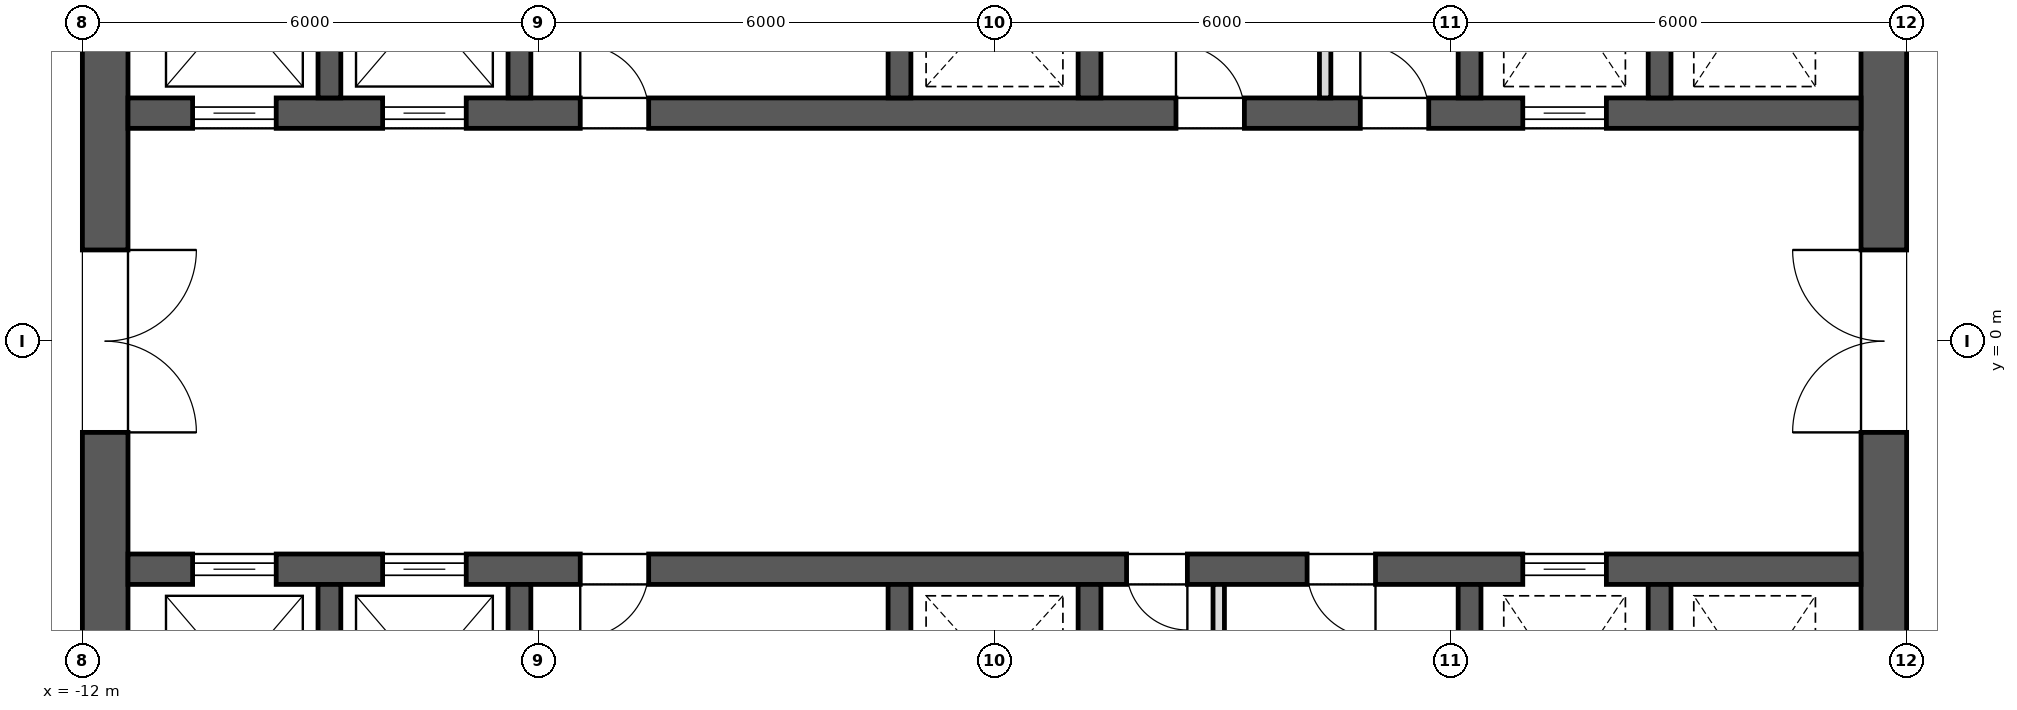
"""IFC4 building model, lengths in metres.
Left out: names, types, materials, properties, quantities, classifications, styles, units other than length and angle.
Written with IfcOpenShell. Run it as: python <this file> out.ifc"""

import sys

from ifc_helpers import new_model, si_unit, direction, frame, frame_2d, origin, place, context, subcontext, project, spatial, rectangle, extrude, element, fill, save


model = new_model("IFC4")
c1 = context("Model", 3, precision=1e-05, world=origin(), true_north=direction((0.0, 1.0)))
c2 = subcontext(c1, "Body", "Model", "MODEL_VIEW")
j1 = project(units=[si_unit("LENGTHUNIT", "METRE"), si_unit("PLANEANGLEUNIT", "RADIAN")], contexts=[c1])
p1 = place(None, origin())
s1 = spatial("IfcSite", under=j1, at=p1, CompositionType="ELEMENT")
p2 = place(p1, origin())
s2 = spatial("IfcBuilding", under=s1, at=p2, CompositionType="ELEMENT")
p3 = place(p2, frame((0.0, 0.0, 316.3)))
s3 = spatial("IfcBuildingStorey", under=s2, at=p3, CompositionType="ELEMENT", Elevation=316.3)
p4 = place(p3, frame((11.7, -11.4, 0.0), z_axis=(0.0, 0.0, 1.0), x_axis=(0.0, 1.0, 0.0)))
e1 = element("IfcWall", 1, at=p4, inside=s3, PredefinedType="SHEAR", context=c2, shape_type="SweptSolid", body=[
    extrude(rectangle(XDim=22.8, YDim=0.6, at=frame_2d((11.4, 0.0))), origin(), (0.0, 0.0, 1.0), 4.0),
])
p5 = place(p4, frame((10.2, 0.0, 0.0)))
e2 = element("IfcOpeningElement", 2, at=p5, cuts=e1, PredefinedType="OPENING", context=c2, shape_type="SweptSolid", body=[
    extrude(rectangle(XDim=2.4, YDim=2.1, at=frame_2d((1.2, 1.05))), frame((0.0, 0.312, 0.0), z_axis=(0.0, -1.0, 0.0), x_axis=(1.0, 0.0, 0.0)), (0.0, 0.0, 1.0), 0.624),
])
p6 = place(p4, frame((19.5, 0.0, 0.0)))
e3 = element("IfcOpeningElement", 3, at=p6, cuts=e1, PredefinedType="OPENING", context=c2, shape_type="SweptSolid", body=[
    extrude(rectangle(XDim=1.2, YDim=2.1, at=frame_2d((0.6, 1.05))), frame((0.0, 0.312, 0.0), z_axis=(0.0, -1.0, 0.0), x_axis=(1.0, 0.0, 0.0)), (0.0, 0.0, 1.0), 0.624),
])
p7 = place(p4, frame((2.1, 0.0, 0.0)))
e4 = element("IfcOpeningElement", 4, at=p7, cuts=e1, PredefinedType="OPENING", context=c2, shape_type="SweptSolid", body=[
    extrude(rectangle(XDim=1.2, YDim=2.1, at=frame_2d((0.6, 1.05))), frame((0.0, 0.312, 0.0), z_axis=(0.0, -1.0, 0.0), x_axis=(1.0, 0.0, 0.0)), (0.0, 0.0, 1.0), 0.624),
])
p8 = place(p3, frame((-11.7, -11.4, 0.0), z_axis=(0.0, 0.0, 1.0), x_axis=(0.0, 1.0, 0.0)))
e5 = element("IfcWall", 5, at=p8, inside=s3, PredefinedType="SHEAR", context=c2, shape_type="SweptSolid", body=[
    extrude(rectangle(XDim=22.8, YDim=0.6, at=frame_2d((11.4, 0.0))), origin(), (0.0, 0.0, 1.0), 4.0),
])
p9 = place(p8, frame((10.2, 0.0, 0.0)))
e6 = element("IfcOpeningElement", 6, at=p9, cuts=e5, PredefinedType="OPENING", context=c2, shape_type="SweptSolid", body=[
    extrude(rectangle(XDim=2.4, YDim=2.1, at=frame_2d((1.2, 1.05))), frame((0.0, 0.312, 0.0), z_axis=(0.0, -1.0, 0.0), x_axis=(1.0, 0.0, 0.0)), (0.0, 0.0, 1.0), 0.624),
])
p10 = place(p8, frame((18.925, 0.0, 0.0)))
e7 = element("IfcOpeningElement", 7, at=p10, cuts=e5, PredefinedType="OPENING", context=c2, shape_type="SweptSolid", body=[
    extrude(rectangle(XDim=1.2, YDim=2.1, at=frame_2d((0.6, 1.05))), frame((0.0, 0.312, 0.0), z_axis=(0.0, -1.0, 0.0), x_axis=(1.0, 0.0, 0.0)), (0.0, 0.0, 1.0), 0.624),
])
p11 = place(p8, frame((2.675, 0.0, 0.0)))
e8 = element("IfcOpeningElement", 8, at=p11, cuts=e5, PredefinedType="OPENING", context=c2, shape_type="SweptSolid", body=[
    extrude(rectangle(XDim=1.2, YDim=2.1, at=frame_2d((0.6, 1.05))), frame((0.0, 0.312, 0.0), z_axis=(0.0, -1.0, 0.0), x_axis=(1.0, 0.0, 0.0)), (0.0, 0.0, 1.0), 0.624),
])
p12 = place(p3, frame((-11.4, 3.0, 0.0), z_axis=(0.0, 0.0, 1.0), x_axis=(1.0, 0.0, 0.0)))
e9 = element("IfcWall", 9, at=p12, inside=s3, PredefinedType="SHEAR", context=c2, shape_type="SweptSolid", body=[
    extrude(rectangle(XDim=22.8, YDim=0.4, at=frame_2d((11.4, 0.0))), origin(), (0.0, 0.0, 1.0), 4.0),
])
p13 = place(p12, frame((0.85, 0.0, 0.0)))
e10 = element("IfcOpeningElement", 10, at=p13, cuts=e9, PredefinedType="OPENING", context=c2, shape_type="SweptSolid", body=[
    extrude(rectangle(XDim=1.1, YDim=2.1, at=frame_2d((0.55, 1.05))), frame((0.0, 0.212, 0.0), z_axis=(0.0, -1.0, 0.0), x_axis=(1.0, 0.0, 0.0)), (0.0, 0.0, 1.0), 0.424),
])
p14 = place(p12, frame((3.35, 0.0, 0.0)))
e11 = element("IfcOpeningElement", 11, at=p14, cuts=e9, PredefinedType="OPENING", context=c2, shape_type="SweptSolid", body=[
    extrude(rectangle(XDim=1.1, YDim=2.1, at=frame_2d((0.55, 1.05))), frame((0.0, 0.212, 0.0), z_axis=(0.0, -1.0, 0.0), x_axis=(1.0, 0.0, 0.0)), (0.0, 0.0, 1.0), 0.424),
])
p15 = place(p12, frame((18.35, 0.0, 0.0)))
e12 = element("IfcOpeningElement", 12, at=p15, cuts=e9, PredefinedType="OPENING", context=c2, shape_type="SweptSolid", body=[
    extrude(rectangle(XDim=1.1, YDim=2.1, at=frame_2d((0.55, 1.05))), frame((0.0, 0.212, 0.0), z_axis=(0.0, -1.0, 0.0), x_axis=(1.0, 0.0, 0.0)), (0.0, 0.0, 1.0), 0.424),
])
p16 = place(p12, frame((13.788, 0.0, 0.0)))
e13 = element("IfcOpeningElement", 13, at=p16, cuts=e9, PredefinedType="OPENING", context=c2, shape_type="SweptSolid", body=[
    extrude(rectangle(XDim=0.9, YDim=2.1, at=frame_2d((0.45, 1.05))), frame((0.0, 0.212, 0.0), z_axis=(0.0, -1.0, 0.0), x_axis=(1.0, 0.0, 0.0)), (0.0, 0.0, 1.0), 0.424),
])
p17 = place(p12, frame((16.212, 0.0, 0.0)))
e14 = element("IfcOpeningElement", 14, at=p17, cuts=e9, PredefinedType="OPENING", context=c2, shape_type="SweptSolid", body=[
    extrude(rectangle(XDim=0.9, YDim=2.1, at=frame_2d((0.45, 1.05))), frame((0.0, 0.212, 0.0), z_axis=(0.0, -1.0, 0.0), x_axis=(1.0, 0.0, 0.0)), (0.0, 0.0, 1.0), 0.424),
])
p18 = place(p12, frame((5.95, 0.0, 0.0)))
e15 = element("IfcOpeningElement", 15, at=p18, cuts=e9, PredefinedType="OPENING", context=c2, shape_type="SweptSolid", body=[
    extrude(rectangle(XDim=0.9, YDim=2.1, at=frame_2d((0.45, 1.05))), frame((0.0, 0.212, 0.0), z_axis=(0.0, -1.0, 0.0), x_axis=(1.0, 0.0, 0.0)), (0.0, 0.0, 1.0), 0.424),
])
for number, where, z_axis, x_axis in (
    (16, (-8.75, 3.2, 0.0), (0.0, 0.0, 1.0), (0.0, 1.0, 0.0)),
    (17, (-6.25, 3.2, 0.0), (0.0, 0.0, 1.0), (0.0, 1.0, 0.0)),
    (18, (-1.25, 3.2, 0.0), (0.0, 0.0, 1.0), (0.0, 1.0, 0.0)),
    (19, (1.25, 3.2, 0.0), (0.0, 0.0, 1.0), (0.0, 1.0, 0.0)),
    (20, (6.25, 3.2, 0.0), (0.0, 0.0, 1.0), (0.0, 1.0, 0.0)),
    (21, (8.75, 3.2, 0.0), (0.0, 0.0, 1.0), (0.0, 1.0, 0.0)),
):
    element("IfcWall", number, at=place(p3, frame(where, z_axis=z_axis, x_axis=x_axis)), inside=s3, PredefinedType="SHEAR", context=c2, shape_type="SweptSolid", body=[
        extrude(rectangle(XDim=2.9, YDim=0.3, at=frame_2d((1.45, 0.0))), origin(), (0.0, 0.0, 1.0), 4.0),
    ])
p19 = place(p3, frame((-11.4, -3.0, 0.0), z_axis=(0.0, 0.0, 1.0), x_axis=(1.0, 0.0, 0.0)))
e22 = element("IfcWall", 22, at=p19, inside=s3, PredefinedType="SHEAR", context=c2, shape_type="SweptSolid", body=[
    extrude(rectangle(XDim=22.8, YDim=0.4, at=frame_2d((11.4, 0.0))), origin(), (0.0, 0.0, 1.0), 4.0),
])
p20 = place(p19, frame((0.85, 0.0, 0.0)))
e23 = element("IfcOpeningElement", 23, at=p20, cuts=e22, PredefinedType="OPENING", context=c2, shape_type="SweptSolid", body=[
    extrude(rectangle(XDim=1.1, YDim=2.1, at=frame_2d((0.55, 1.05))), frame((0.0, 0.212, 0.0), z_axis=(0.0, -1.0, 0.0), x_axis=(1.0, 0.0, 0.0)), (0.0, 0.0, 1.0), 0.424),
])
p21 = place(p19, frame((3.35, 0.0, 0.0)))
e24 = element("IfcOpeningElement", 24, at=p21, cuts=e22, PredefinedType="OPENING", context=c2, shape_type="SweptSolid", body=[
    extrude(rectangle(XDim=1.1, YDim=2.1, at=frame_2d((0.55, 1.05))), frame((0.0, 0.212, 0.0), z_axis=(0.0, -1.0, 0.0), x_axis=(1.0, 0.0, 0.0)), (0.0, 0.0, 1.0), 0.424),
])
p22 = place(p19, frame((18.35, 0.0, 0.0)))
e25 = element("IfcOpeningElement", 25, at=p22, cuts=e22, PredefinedType="OPENING", context=c2, shape_type="SweptSolid", body=[
    extrude(rectangle(XDim=1.1, YDim=2.1, at=frame_2d((0.55, 1.05))), frame((0.0, 0.212, 0.0), z_axis=(0.0, -1.0, 0.0), x_axis=(1.0, 0.0, 0.0)), (0.0, 0.0, 1.0), 0.424),
])
p23 = place(p19, frame((13.137, 0.0, 0.0)))
e26 = element("IfcOpeningElement", 26, at=p23, cuts=e22, PredefinedType="OPENING", context=c2, shape_type="SweptSolid", body=[
    extrude(rectangle(XDim=0.8, YDim=2.1, at=frame_2d((0.4, 1.05))), frame((0.0, 0.212, 0.0), z_axis=(0.0, -1.0, 0.0), x_axis=(1.0, 0.0, 0.0)), (0.0, 0.0, 1.0), 0.424),
])
p24 = place(p19, frame((15.512, 0.0, 0.0)))
e27 = element("IfcOpeningElement", 27, at=p24, cuts=e22, PredefinedType="OPENING", context=c2, shape_type="SweptSolid", body=[
    extrude(rectangle(XDim=0.9, YDim=2.1, at=frame_2d((0.45, 1.05))), frame((0.0, 0.212, 0.0), z_axis=(0.0, -1.0, 0.0), x_axis=(1.0, 0.0, 0.0)), (0.0, 0.0, 1.0), 0.424),
])
p25 = place(p19, frame((5.95, 0.0, 0.0)))
e28 = element("IfcOpeningElement", 28, at=p25, cuts=e22, PredefinedType="OPENING", context=c2, shape_type="SweptSolid", body=[
    extrude(rectangle(XDim=0.9, YDim=2.1, at=frame_2d((0.45, 1.05))), frame((0.0, 0.212, 0.0), z_axis=(0.0, -1.0, 0.0), x_axis=(1.0, 0.0, 0.0)), (0.0, 0.0, 1.0), 0.424),
])
for number, where, z_axis, x_axis in (
    (29, (-8.75, -6.1, 0.0), (0.0, 0.0, 1.0), (0.0, 1.0, 0.0)),
    (30, (-6.25, -6.1, 0.0), (0.0, 0.0, 1.0), (0.0, 1.0, 0.0)),
    (31, (-1.25, -6.1, 0.0), (0.0, 0.0, 1.0), (0.0, 1.0, 0.0)),
    (32, (1.25, -6.1, 0.0), (0.0, 0.0, 1.0), (0.0, 1.0, 0.0)),
    (33, (6.25, -6.1, 0.0), (0.0, 0.0, 1.0), (0.0, 1.0, 0.0)),
    (34, (8.75, -6.1, 0.0), (0.0, 0.0, 1.0), (0.0, 1.0, 0.0)),
):
    element("IfcWall", number, at=place(p3, frame(where, z_axis=z_axis, x_axis=x_axis)), inside=s3, PredefinedType="SHEAR", context=c2, shape_type="SweptSolid", body=[
        extrude(rectangle(XDim=2.9, YDim=0.3, at=frame_2d((1.45, 0.0))), origin(), (0.0, 0.0, 1.0), 4.0),
    ])
for number, where, z_axis, x_axis in (
    (35, (4.35, 3.2, 0.0), (0.0, 0.0, 1.0), (0.0, 1.0, 0.0)),
    (36, (2.95, -6.1, 0.0), (0.0, 0.0, 1.0), (0.0, 1.0, 0.0)),
):
    element("IfcWall", number, at=place(p3, frame(where, z_axis=z_axis, x_axis=x_axis)), inside=s3, PredefinedType="PARTITIONING", context=c2, shape_type="SweptSolid", body=[
        extrude(rectangle(XDim=2.9, YDim=0.15, at=frame_2d((1.45, 0.0))), origin(), (0.0, 0.0, 1.0), 3.7),
    ])
p26 = place(p13, origin())
e37 = element("IfcDoor", 37, at=p26, inside=s3, OperationType="SLIDING_TO_LEFT", PredefinedType="DOOR", context=c2, shape_type="SweptSolid", body=[
    extrude(rectangle(XDim=1.1, YDim=2.1, at=frame_2d((0.55, 1.05))), frame((0.0, 0.025, 0.0), z_axis=(0.0, -1.0, 0.0), x_axis=(1.0, 0.0, 0.0)), (0.0, 0.0, 1.0), 0.05),
])
fill(e10, e37)
p27 = place(p14, origin())
e38 = element("IfcDoor", 38, at=p27, inside=s3, OperationType="SLIDING_TO_LEFT", PredefinedType="DOOR", context=c2, shape_type="SweptSolid", body=[
    extrude(rectangle(XDim=1.1, YDim=2.1, at=frame_2d((0.55, 1.05))), frame((0.0, 0.025, 0.0), z_axis=(0.0, -1.0, 0.0), x_axis=(1.0, 0.0, 0.0)), (0.0, 0.0, 1.0), 0.05),
])
fill(e11, e38)
p28 = place(p20, origin())
e39 = element("IfcDoor", 39, at=p28, inside=s3, OperationType="SLIDING_TO_LEFT", PredefinedType="DOOR", context=c2, shape_type="SweptSolid", body=[
    extrude(rectangle(XDim=1.1, YDim=2.1, at=frame_2d((0.55, 1.05))), frame((0.0, 0.025, 0.0), z_axis=(0.0, -1.0, 0.0), x_axis=(1.0, 0.0, 0.0)), (0.0, 0.0, 1.0), 0.05),
])
fill(e23, e39)
p29 = place(p21, origin())
e40 = element("IfcDoor", 40, at=p29, inside=s3, OperationType="SLIDING_TO_LEFT", PredefinedType="DOOR", context=c2, shape_type="SweptSolid", body=[
    extrude(rectangle(XDim=1.1, YDim=2.1, at=frame_2d((0.55, 1.05))), frame((0.0, 0.025, 0.0), z_axis=(0.0, -1.0, 0.0), x_axis=(1.0, 0.0, 0.0)), (0.0, 0.0, 1.0), 0.05),
])
fill(e24, e40)
p30 = place(p15, origin())
e41 = element("IfcDoor", 41, at=p30, inside=s3, OperationType="SLIDING_TO_LEFT", PredefinedType="DOOR", context=c2, shape_type="SweptSolid", body=[
    extrude(rectangle(XDim=1.1, YDim=2.1, at=frame_2d((0.55, 1.05))), frame((0.0, 0.025, 0.0), z_axis=(0.0, -1.0, 0.0), x_axis=(1.0, 0.0, 0.0)), (0.0, 0.0, 1.0), 0.05),
])
fill(e12, e41)
p31 = place(p22, origin())
e42 = element("IfcDoor", 42, at=p31, inside=s3, OperationType="SLIDING_TO_LEFT", PredefinedType="DOOR", context=c2, shape_type="SweptSolid", body=[
    extrude(rectangle(XDim=1.1, YDim=2.1, at=frame_2d((0.55, 1.05))), frame((0.0, 0.025, 0.0), z_axis=(0.0, -1.0, 0.0), x_axis=(1.0, 0.0, 0.0)), (0.0, 0.0, 1.0), 0.05),
])
fill(e25, e42)
p32 = place(p9, frame((2.4, 0.0, 0.0), z_axis=(0.0, 0.0, 1.0), x_axis=(-1.0, 0.0, 0.0)))
e43 = element("IfcDoor", 43, at=p32, inside=s3, OperationType="DOUBLE_DOOR_SINGLE_SWING", PredefinedType="DOOR", context=c2, shape_type="SweptSolid", body=[
    extrude(rectangle(XDim=2.4, YDim=2.1, at=frame_2d((1.2, 1.05))), frame((0.0, 0.025, 0.0), z_axis=(0.0, -1.0, 0.0), x_axis=(1.0, 0.0, 0.0)), (0.0, 0.0, 1.0), 0.05),
])
fill(e6, e43)
p33 = place(p5, origin())
e44 = element("IfcDoor", 44, at=p33, inside=s3, OperationType="DOUBLE_DOOR_SINGLE_SWING", PredefinedType="DOOR", context=c2, shape_type="SweptSolid", body=[
    extrude(rectangle(XDim=2.4, YDim=2.1, at=frame_2d((1.2, 1.05))), frame((0.0, 0.025, 0.0), z_axis=(0.0, -1.0, 0.0), x_axis=(1.0, 0.0, 0.0)), (0.0, 0.0, 1.0), 0.05),
])
fill(e2, e44)
p34 = place(p16, origin())
e45 = element("IfcDoor", 45, at=p34, inside=s3, OperationType="SINGLE_SWING_RIGHT", PredefinedType="DOOR", context=c2, shape_type="SweptSolid", body=[
    extrude(rectangle(XDim=0.9, YDim=2.1, at=frame_2d((0.45, 1.05))), frame((0.0, 0.025, 0.0), z_axis=(0.0, -1.0, 0.0), x_axis=(1.0, 0.0, 0.0)), (0.0, 0.0, 1.0), 0.05),
])
fill(e13, e45)
p35 = place(p17, origin())
e46 = element("IfcDoor", 46, at=p35, inside=s3, OperationType="SINGLE_SWING_RIGHT", PredefinedType="DOOR", context=c2, shape_type="SweptSolid", body=[
    extrude(rectangle(XDim=0.9, YDim=2.1, at=frame_2d((0.45, 1.05))), frame((0.0, 0.025, 0.0), z_axis=(0.0, -1.0, 0.0), x_axis=(1.0, 0.0, 0.0)), (0.0, 0.0, 1.0), 0.05),
])
fill(e14, e46)
p36 = place(p18, origin())
e47 = element("IfcDoor", 47, at=p36, inside=s3, OperationType="SINGLE_SWING_RIGHT", PredefinedType="DOOR", context=c2, shape_type="SweptSolid", body=[
    extrude(rectangle(XDim=0.9, YDim=2.1, at=frame_2d((0.45, 1.05))), frame((0.0, 0.025, 0.0), z_axis=(0.0, -1.0, 0.0), x_axis=(1.0, 0.0, 0.0)), (0.0, 0.0, 1.0), 0.05),
])
fill(e15, e47)
p37 = place(p23, frame((0.8, 0.0, 0.0), z_axis=(0.0, 0.0, 1.0), x_axis=(-1.0, 0.0, 0.0)))
e48 = element("IfcDoor", 48, at=p37, inside=s3, OperationType="SINGLE_SWING_RIGHT", PredefinedType="DOOR", context=c2, shape_type="SweptSolid", body=[
    extrude(rectangle(XDim=0.8, YDim=2.1, at=frame_2d((0.4, 1.05))), frame((0.0, 0.025, 0.0), z_axis=(0.0, -1.0, 0.0), x_axis=(1.0, 0.0, 0.0)), (0.0, 0.0, 1.0), 0.05),
])
fill(e26, e48)
p38 = place(p24, frame((0.9, 0.0, 0.0), z_axis=(0.0, 0.0, 1.0), x_axis=(-1.0, 0.0, 0.0)))
e49 = element("IfcDoor", 49, at=p38, inside=s3, OperationType="SINGLE_SWING_RIGHT", PredefinedType="DOOR", context=c2, shape_type="SweptSolid", body=[
    extrude(rectangle(XDim=0.9, YDim=2.1, at=frame_2d((0.45, 1.05))), frame((0.0, 0.025, 0.0), z_axis=(0.0, -1.0, 0.0), x_axis=(1.0, 0.0, 0.0)), (0.0, 0.0, 1.0), 0.05),
])
fill(e27, e49)
p39 = place(p25, frame((0.9, 0.0, 0.0), z_axis=(0.0, 0.0, 1.0), x_axis=(-1.0, 0.0, 0.0)))
e50 = element("IfcDoor", 50, at=p39, inside=s3, OperationType="SINGLE_SWING_LEFT", PredefinedType="DOOR", context=c2, shape_type="SweptSolid", body=[
    extrude(rectangle(XDim=0.9, YDim=2.1, at=frame_2d((0.45, 1.05))), frame((0.0, 0.025, 0.0), z_axis=(0.0, -1.0, 0.0), x_axis=(1.0, 0.0, 0.0)), (0.0, 0.0, 1.0), 0.05),
])
fill(e28, e50)
save(model, sys.argv[1])
